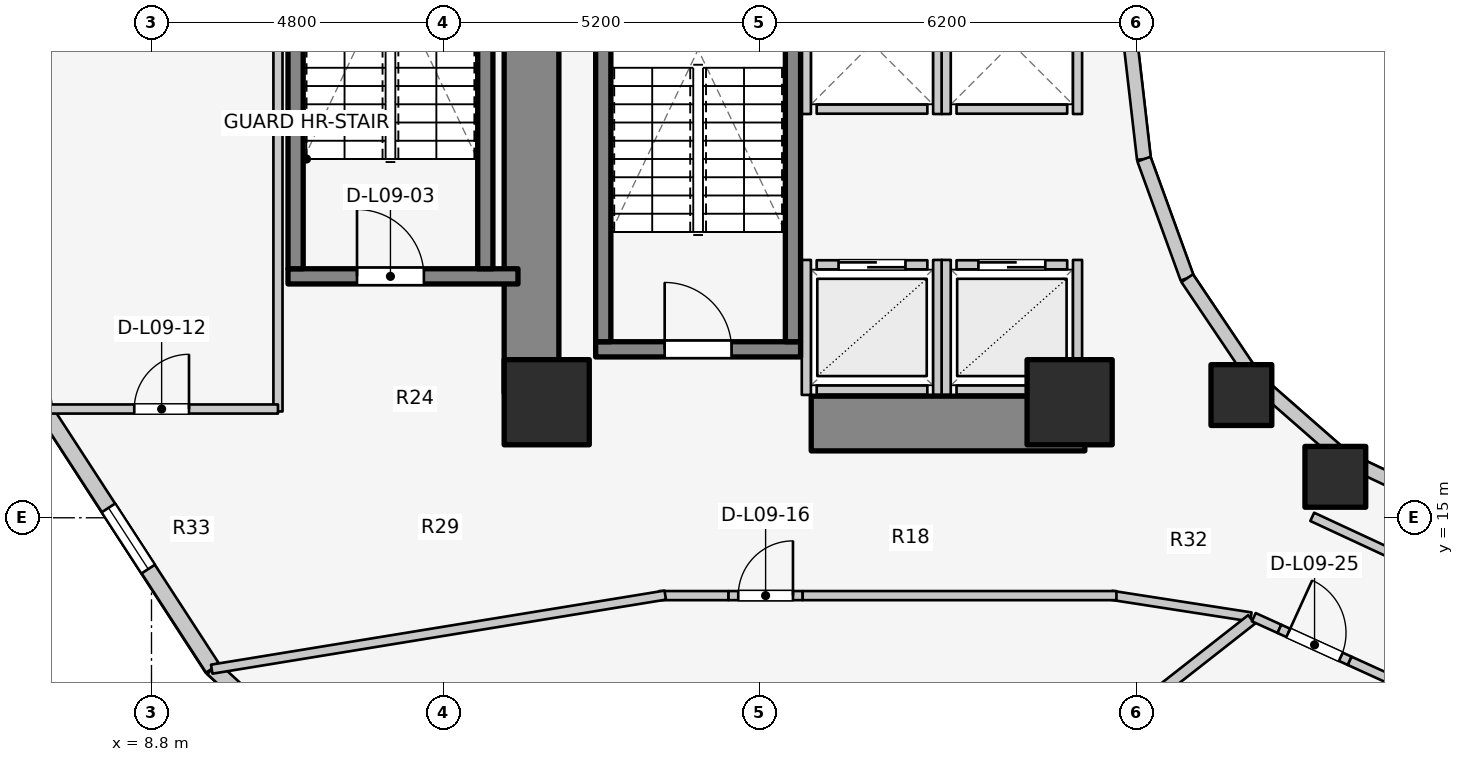
"""IFC4 building model, lengths in metres.
Left out: names, types, materials, properties, quantities, classifications, styles, units other than length and angle.
Written with IfcOpenShell. Run it as: python <this file> out.ifc"""

import sys

from ifc_helpers import new_model, si_unit, direction, frame, frame_2d, origin, origin_2d, place, context, subcontext, project, spatial, rectangle, extrude, element, fill, save


model = new_model("IFC4")
c1 = context("Model", 3, precision=1e-05, world=origin(), true_north=direction((0.0, 1.0)))
c2 = subcontext(c1, "Body", "Model", "MODEL_VIEW")
j1 = project(units=[si_unit("LENGTHUNIT", "METRE"), si_unit("PLANEANGLEUNIT", "RADIAN")], contexts=[c1])
p1 = place(None, origin())
s1 = spatial("IfcSite", under=j1, at=p1, CompositionType="ELEMENT")
p2 = place(p1, origin())
s2 = spatial("IfcBuilding", under=s1, at=p2, CompositionType="ELEMENT")
p3 = place(p2, frame((0.0, 0.0, 33.8)))
s3 = spatial("IfcBuildingStorey", under=s2, at=p3, CompositionType="ELEMENT", Elevation=33.8)
p4 = place(p3, frame((15.05, 17.05, 0.0), z_axis=(0.0, 0.0, 1.0), x_axis=(0.0, 1.0, 0.0)))
e1 = element("IfcWall", 1, at=p4, inside=s3, PredefinedType="SHEAR", context=c2, shape_type="SweptSolid", body=[
    extrude(rectangle(XDim=12.8, YDim=0.9, at=frame_2d((6.4, 0.0))), origin(), (0.0, 0.0, 1.0), 3.1),
])
p5 = place(p3, frame((19.65, 16.55, 0.0), z_axis=(0.0, 0.0, 1.0), x_axis=(1.0, 0.0, 0.0)))
e2 = element("IfcWall", 2, at=p5, inside=s3, PredefinedType="SHEAR", context=c2, shape_type="SweptSolid", body=[
    extrude(rectangle(XDim=4.5, YDim=0.9, at=frame_2d((2.25, 0.0))), origin(), (0.0, 0.0, 1.0), 3.1),
])
p6 = place(p3, frame((16.105, 17.77, 0.0), z_axis=(0.0, 0.0, 1.0), x_axis=(1.0, 0.0, 0.0)))
e3 = element("IfcWall", 3, at=p6, inside=s3, PredefinedType="SOLIDWALL", context=c2, shape_type="SweptSolid", body=[
    extrude(rectangle(XDim=3.37, YDim=0.25, at=frame_2d((1.685, 0.0))), origin(), (0.0, 0.0, 1.0), 3.1),
])
p7 = place(p6, frame((1.135, 0.0, 0.0)))
e4 = element("IfcOpeningElement", 4, at=p7, cuts=e3, PredefinedType="OPENING", context=c2, shape_type="SweptSolid", body=[
    extrude(rectangle(XDim=1.1, YDim=2.1, at=frame_2d((0.55, 1.05))), frame((0.0, 0.135, 0.0), z_axis=(0.0, -1.0, 0.0), x_axis=(1.0, 0.0, 0.0)), (0.0, 0.0, 1.0), 0.27),
])
for number, where, z_axis, x_axis in (
    (5, (16.23, 17.895, 0.0), (0.0, 0.0, 1.0), (0.0, 1.0, 0.0)),
    (6, (19.35, 17.895, 0.0), (0.0, 0.0, 1.0), (0.0, 1.0, 0.0)),
):
    element("IfcWall", number, at=place(p3, frame(where, z_axis=z_axis, x_axis=x_axis)), inside=s3, PredefinedType="SOLIDWALL", context=c2, shape_type="SweptSolid", body=[
        extrude(rectangle(XDim=7.81, YDim=0.25, at=frame_2d((3.905, 0.0))), origin(), (0.0, 0.0, 1.0), 3.1),
    ])
p8 = place(p3, frame((11.045, 18.97, 0.0), z_axis=(0.0, 0.0, 1.0), x_axis=(1.0, 0.0, 0.0)))
e7 = element("IfcWall", 7, at=p8, inside=s3, PredefinedType="SOLIDWALL", context=c2, shape_type="SweptSolid", body=[
    extrude(rectangle(XDim=3.782, YDim=0.25, at=frame_2d((1.891, 0.0))), origin(), (0.0, 0.0, 1.0), 3.1),
])
p9 = place(p8, frame((1.135, 0.0, 0.0)))
e8 = element("IfcOpeningElement", 8, at=p9, cuts=e7, PredefinedType="OPENING", context=c2, shape_type="SweptSolid", body=[
    extrude(rectangle(XDim=1.1, YDim=2.1, at=frame_2d((0.55, 1.05))), frame((0.0, 0.135, 0.0), z_axis=(0.0, -1.0, 0.0), x_axis=(1.0, 0.0, 0.0)), (0.0, 0.0, 1.0), 0.27),
])
for number, where, z_axis, x_axis in (
    (9, (11.17, 19.095, 0.0), (0.0, 0.0, 1.0), (0.0, 1.0, 0.0)),
    (10, (14.29, 19.095, 0.0), (0.0, 0.0, 1.0), (0.0, 1.0, 0.0)),
):
    element("IfcWall", number, at=place(p3, frame(where, z_axis=z_axis, x_axis=x_axis)), inside=s3, PredefinedType="SOLIDWALL", context=c2, shape_type="SweptSolid", body=[
        extrude(rectangle(XDim=7.81, YDim=0.25, at=frame_2d((3.905, 0.0))), origin(), (0.0, 0.0, 1.0), 3.1),
    ])
for number, where, z_axis, x_axis in (
    (11, (15.3, 16.9, 0.0), (0.0, 0.0, 1.0), (1.0, 0.0, 0.0)),
    (12, (23.9, 16.9, 0.0), (0.0, 0.0, 1.0), (1.0, 0.0, 0.0)),
):
    element("IfcColumn", number, at=place(p3, frame(where, z_axis=z_axis, x_axis=x_axis)), inside=s3, PredefinedType="COLUMN", context=c2, shape_type="SweptSolid", body=[
        extrude(rectangle(XDim=1.4, YDim=1.4, at=origin_2d()), origin(), (0.0, 0.0, 1.0), 3.1),
    ])
for number, where, z_axis, x_axis in (
    (13, (26.725, 17.018, 0.0), (0.0, 0.0, 1.0), (1.0, 0.0, 0.0)),
    (14, (28.27, 15.673, 0.0), (0.0, 0.0, 1.0), (1.0, 0.0, 0.0)),
):
    element("IfcColumn", number, at=place(p3, frame(where, z_axis=z_axis, x_axis=x_axis)), inside=s3, PredefinedType="COLUMN", context=c2, shape_type="SweptSolid", body=[
        extrude(rectangle(XDim=1.0, YDim=1.0, at=origin_2d()), origin(), (0.0, 0.0, 1.0), 3.1),
    ])
p10 = place(p3, frame((24.88, 23.0, 0.0), z_axis=(0.0, 0.0, 1.0), x_axis=(0.114711713601, -0.993398823617, 0.0)))
e15 = element("IfcWall", 15, at=p10, inside=s3, PredefinedType="STANDARD", context=c2, shape_type="SweptSolid", body=[
    extrude(rectangle(XDim=2.115, YDim=0.23, at=frame_2d((1.058, 0.0))), origin(), (0.0, 0.0, 1.0), 2.56),
])
p11 = place(p3, frame((25.123, 20.898, 0.0), z_axis=(0.0, 0.0, 1.0), x_axis=(0.341423187295, -0.93990968033, 0.0)))
e16 = element("IfcWall", 16, at=p11, inside=s3, PredefinedType="STANDARD", context=c2, shape_type="SweptSolid", body=[
    extrude(rectangle(XDim=2.084, YDim=0.23, at=frame_2d((1.042, 0.0))), origin(), (0.0, 0.0, 1.0), 2.56),
])
p12 = place(p3, frame((25.834, 18.94, 0.0), z_axis=(0.0, 0.0, 1.0), x_axis=(0.558197800898, -0.829707909492, 0.0)))
e17 = element("IfcWall", 17, at=p12, inside=s3, PredefinedType="STANDARD", context=c2, shape_type="SweptSolid", body=[
    extrude(rectangle(XDim=2.027, YDim=0.23, at=frame_2d((1.013, 0.0))), origin(), (0.0, 0.0, 1.0), 1.22),
])
p13 = place(p3, frame((26.965, 17.258, 0.0), z_axis=(0.0, 0.0, 1.0), x_axis=(0.752576694707, -0.658504607869, 0.0)))
e18 = element("IfcWall", 18, at=p13, inside=s3, PredefinedType="STANDARD", context=c2, shape_type="SweptSolid", body=[
    extrude(rectangle(XDim=1.959, YDim=0.23, at=frame_2d((0.98, 0.0))), origin(), (0.0, 0.0, 1.0), 1.22),
])
p14 = place(p3, frame((28.44, 15.968, 0.0), z_axis=(0.0, 0.0, 1.0), x_axis=(0.904179699603, -0.427152280606, 0.0)))
e19 = element("IfcWall", 19, at=p14, inside=s3, PredefinedType="STANDARD", context=c2, shape_type="SweptSolid", body=[
    extrude(rectangle(XDim=1.899, YDim=0.23, at=frame_2d((0.95, 0.0))), origin(), (0.0, 0.0, 1.0), 1.22),
])
p15 = place(p3, frame((7.033, 16.795, 0.0), z_axis=(0.0, 0.0, 1.0), x_axis=(0.544578722263, -0.838709732421, 0.0)))
e20 = element("IfcWall", 20, at=p15, inside=s3, PredefinedType="STANDARD", context=c2, shape_type="SweptSolid", body=[
    extrude(rectangle(XDim=5.092, YDim=0.26, at=frame_2d((2.546, 0.0))), origin(), (0.0, 0.0, 1.0), 1.22),
])
p16 = place(p15, frame((1.946, 0.0, 0.15)))
e21 = element("IfcOpeningElement", 21, at=p16, cuts=e20, PredefinedType="OPENING", context=c2, shape_type="SweptSolid", body=[
    extrude(rectangle(XDim=1.2, YDim=0.9, at=frame_2d((0.6, 0.45))), frame((0.0, 0.14, 0.0), z_axis=(0.0, -1.0, 0.0), x_axis=(1.0, 0.0, 0.0)), (0.0, 0.0, 1.0), 0.28),
])
p17 = place(p3, frame((9.806, 12.524, 0.0), z_axis=(0.0, 0.0, 1.0), x_axis=(0.735655109293, -0.67735630223, 0.0)))
e22 = element("IfcWall", 22, at=p17, inside=s3, PredefinedType="STANDARD", context=c2, shape_type="SweptSolid", body=[
    extrude(rectangle(XDim=5.151, YDim=0.26, at=frame_2d((2.575, 0.0))), origin(), (0.0, 0.0, 1.0), 1.22),
])
p18 = place(p17, frame((1.976, 0.0, 0.15)))
e23 = element("IfcOpeningElement", 23, at=p18, cuts=e22, PredefinedType="OPENING", context=c2, shape_type="SweptSolid", body=[
    extrude(rectangle(XDim=1.2, YDim=0.9, at=frame_2d((0.6, 0.45))), frame((0.0, 0.14, 0.0), z_axis=(0.0, -1.0, 0.0), x_axis=(1.0, 0.0, 0.0)), (0.0, 0.0, 1.0), 0.28),
])
p19 = place(p3, frame((19.74, 19.16, 0.0), z_axis=(0.0, 0.0, 1.0), x_axis=(1.0, 0.0, 0.0)))
e24 = element("IfcWall", 24, at=p19, inside=s3, PredefinedType="SOLIDWALL", context=c2, shape_type="SweptSolid", body=[
    extrude(rectangle(XDim=1.82, YDim=0.15, at=frame_2d((0.91, 0.0))), origin(), (0.0, 0.0, 1.0), 2.575),
])
p20 = place(p19, frame((0.36, 0.0, 0.0)))
e25 = element("IfcOpeningElement", 25, at=p20, cuts=e24, PredefinedType="OPENING", context=c2, shape_type="SweptSolid", body=[
    extrude(rectangle(XDim=1.1, YDim=2.1, at=frame_2d((0.55, 1.05))), frame((0.0, 0.085, 0.0), z_axis=(0.0, -1.0, 0.0), x_axis=(1.0, 0.0, 0.0)), (0.0, 0.0, 1.0), 0.17),
])
p21 = place(p3, frame((19.74, 17.1, 0.0), z_axis=(0.0, 0.0, 1.0), x_axis=(1.0, 0.0, 0.0)))
e26 = element("IfcWall", 26, at=p21, inside=s3, PredefinedType="SOLIDWALL", context=c2, shape_type="SweptSolid", body=[
    extrude(rectangle(XDim=1.82, YDim=0.15, at=frame_2d((0.91, 0.0))), origin(), (0.0, 0.0, 1.0), 2.575),
])
p22 = place(p3, frame((19.57, 17.02, 0.0), z_axis=(0.0, 0.0, 1.0), x_axis=(0.0, 1.0, 0.0)))
e27 = element("IfcWall", 27, at=p22, inside=s3, PredefinedType="SOLIDWALL", context=c2, shape_type="SweptSolid", body=[
    extrude(rectangle(XDim=2.22, YDim=0.15, at=frame_2d((1.11, 0.0))), origin(), (0.0, 0.0, 1.0), 2.12),
])
p23 = place(p3, frame((21.73, 17.02, 0.0), z_axis=(0.0, 0.0, 1.0), x_axis=(0.0, 1.0, 0.0)))
e28 = element("IfcWall", 28, at=p23, inside=s3, PredefinedType="SOLIDWALL", context=c2, shape_type="SweptSolid", body=[
    extrude(rectangle(XDim=2.22, YDim=0.15, at=frame_2d((1.11, 0.0))), origin(), (0.0, 0.0, 1.0), 2.575),
])
p24 = place(p3, frame((22.04, 19.16, 0.0), z_axis=(0.0, 0.0, 1.0), x_axis=(1.0, 0.0, 0.0)))
e29 = element("IfcWall", 29, at=p24, inside=s3, PredefinedType="SOLIDWALL", context=c2, shape_type="SweptSolid", body=[
    extrude(rectangle(XDim=1.82, YDim=0.15, at=frame_2d((0.91, 0.0))), origin(), (0.0, 0.0, 1.0), 2.12),
])
p25 = place(p24, frame((0.36, 0.0, 0.0)))
e30 = element("IfcOpeningElement", 30, at=p25, cuts=e29, PredefinedType="OPENING", context=c2, shape_type="SweptSolid", body=[
    extrude(rectangle(XDim=1.1, YDim=2.1, at=frame_2d((0.55, 1.05))), frame((0.0, 0.085, 0.0), z_axis=(0.0, -1.0, 0.0), x_axis=(1.0, 0.0, 0.0)), (0.0, 0.0, 1.0), 0.17),
])
p26 = place(p3, frame((22.04, 17.1, 0.0), z_axis=(0.0, 0.0, 1.0), x_axis=(1.0, 0.0, 0.0)))
e31 = element("IfcWall", 31, at=p26, inside=s3, PredefinedType="SOLIDWALL", context=c2, shape_type="SweptSolid", body=[
    extrude(rectangle(XDim=1.82, YDim=0.15, at=frame_2d((0.91, 0.0))), origin(), (0.0, 0.0, 1.0), 2.12),
])
p27 = place(p3, frame((21.87, 17.02, 0.0), z_axis=(0.0, 0.0, 1.0), x_axis=(0.0, 1.0, 0.0)))
e32 = element("IfcWall", 32, at=p27, inside=s3, PredefinedType="SOLIDWALL", context=c2, shape_type="SweptSolid", body=[
    extrude(rectangle(XDim=2.22, YDim=0.15, at=frame_2d((1.11, 0.0))), origin(), (0.0, 0.0, 1.0), 2.575),
])
p28 = place(p3, frame((24.03, 17.02, 0.0), z_axis=(0.0, 0.0, 1.0), x_axis=(0.0, 1.0, 0.0)))
e33 = element("IfcWall", 33, at=p28, inside=s3, PredefinedType="SOLIDWALL", context=c2, shape_type="SweptSolid", body=[
    extrude(rectangle(XDim=2.22, YDim=0.15, at=frame_2d((1.11, 0.0))), origin(), (0.0, 0.0, 1.0), 1.873),
])
p29 = place(p3, frame((19.74, 21.72, 0.0), z_axis=(0.0, 0.0, 1.0), x_axis=(1.0, 0.0, 0.0)))
e34 = element("IfcWall", 34, at=p29, inside=s3, PredefinedType="SOLIDWALL", context=c2, shape_type="SweptSolid", body=[
    extrude(rectangle(XDim=1.82, YDim=0.15, at=frame_2d((0.91, 0.0))), origin(), (0.0, 0.0, 1.0), 2.575),
])
for number, where, z_axis, x_axis in (
    (35, (19.57, 21.64, 0.0), (0.0, 0.0, 1.0), (0.0, 1.0, 0.0)),
    (36, (21.73, 21.64, 0.0), (0.0, 0.0, 1.0), (0.0, 1.0, 0.0)),
):
    element("IfcWall", number, at=place(p3, frame(where, z_axis=z_axis, x_axis=x_axis)), inside=s3, PredefinedType="SOLIDWALL", context=c2, shape_type="SweptSolid", body=[
        extrude(rectangle(XDim=2.32, YDim=0.15, at=frame_2d((1.16, 0.0))), origin(), (0.0, 0.0, 1.0), 2.575),
    ])
p30 = place(p3, frame((22.04, 21.72, 0.0), z_axis=(0.0, 0.0, 1.0), x_axis=(1.0, 0.0, 0.0)))
e37 = element("IfcWall", 37, at=p30, inside=s3, PredefinedType="SOLIDWALL", context=c2, shape_type="SweptSolid", body=[
    extrude(rectangle(XDim=1.82, YDim=0.15, at=frame_2d((0.91, 0.0))), origin(), (0.0, 0.0, 1.0), 2.12),
])
p31 = place(p3, frame((21.87, 21.64, 0.0), z_axis=(0.0, 0.0, 1.0), x_axis=(0.0, 1.0, 0.0)))
e38 = element("IfcWall", 38, at=p31, inside=s3, PredefinedType="SOLIDWALL", context=c2, shape_type="SweptSolid", body=[
    extrude(rectangle(XDim=2.32, YDim=0.15, at=frame_2d((1.16, 0.0))), origin(), (0.0, 0.0, 1.0), 2.575),
])
p32 = place(p3, frame((24.03, 21.64, 0.0), z_axis=(0.0, 0.0, 1.0), x_axis=(0.0, 1.0, 0.0)))
e39 = element("IfcWall", 39, at=p32, inside=s3, PredefinedType="SOLIDWALL", context=c2, shape_type="SweptSolid", body=[
    extrude(rectangle(XDim=2.32, YDim=0.15, at=frame_2d((1.16, 0.0))), origin(), (0.0, 0.0, 1.0), 2.12),
])
p33 = place(p3, frame((27.89, 15.015, 0.0), z_axis=(0.0, 0.0, 1.0), x_axis=(0.906943449489, -0.421252393975, 0.0)))
e40 = element("IfcWall", 40, at=p33, inside=s3, PredefinedType="PARTITIONING", context=c2, shape_type="SweptSolid", body=[
    extrude(rectangle(XDim=2.186, YDim=0.15, at=frame_2d((1.093, 0.0))), origin(), (0.0, 0.0, 1.0), 1.22),
])
p34 = place(p3, frame((10.88, 16.748, 0.0), z_axis=(0.0, 0.0, 1.0), x_axis=(0.0, 1.0, 0.0)))
e41 = element("IfcWall", 41, at=p34, inside=s3, PredefinedType="PARTITIONING", context=c2, shape_type="SweptSolid", body=[
    extrude(rectangle(XDim=12.503, YDim=0.15, at=frame_2d((6.252, 0.0))), origin(), (0.0, 0.0, 1.0), 2.12),
])
p35 = place(p3, frame((7.014, 16.788, 0.0), z_axis=(0.0, 0.0, 1.0), x_axis=(1.0, 0.0, 0.0)))
e42 = element("IfcWall", 42, at=p35, inside=s3, PredefinedType="PARTITIONING", context=c2, shape_type="SweptSolid", body=[
    extrude(rectangle(XDim=3.866, YDim=0.15, at=frame_2d((1.933, 0.0))), origin(), (0.0, 0.0, 1.0), 2.575),
])
p36 = place(p35, frame((1.503, 0.0, 0.0)))
e43 = element("IfcOpeningElement", 43, at=p36, cuts=e42, PredefinedType="OPENING", context=c2, shape_type="SweptSolid", body=[
    extrude(rectangle(XDim=0.9, YDim=2.1, at=frame_2d((0.45, 1.05))), frame((0.0, 0.085, 0.0), z_axis=(0.0, -1.0, 0.0), x_axis=(1.0, 0.0, 0.0)), (0.0, 0.0, 1.0), 0.17),
])
p37 = place(p3, frame((26.881, 13.369, 0.0), z_axis=(0.0, 0.0, 1.0), x_axis=(-0.988184633586, 0.153268163508, 0.0)))
e44 = element("IfcWall", 44, at=p37, inside=s3, PredefinedType="PARTITIONING", context=c2, shape_type="SweptSolid", body=[
    extrude(rectangle(XDim=2.318, YDim=0.15, at=frame_2d((1.159, 0.0))), origin(), (0.0, 0.0, 1.0), 1.22),
])
p38 = place(p3, frame((17.15, 13.72, 0.0), z_axis=(0.0, 0.0, 1.0), x_axis=(1.0, 0.0, 0.0)))
e45 = element("IfcWall", 45, at=p38, inside=s3, PredefinedType="PARTITIONING", context=c2, shape_type="SweptSolid", body=[
    extrude(rectangle(XDim=1.14, YDim=0.15, at=frame_2d((0.57, 0.0))), origin(), (0.0, 0.0, 1.0), 2.575),
])
p39 = place(p3, frame((18.29, 13.72, 0.0), z_axis=(0.0, 0.0, 1.0), x_axis=(1.0, 0.0, 0.0)))
e46 = element("IfcWall", 46, at=p39, inside=s3, PredefinedType="PARTITIONING", context=c2, shape_type="SweptSolid", body=[
    extrude(rectangle(XDim=1.22, YDim=0.15, at=frame_2d((0.61, 0.0))), origin(), (0.0, 0.0, 1.0), 2.575),
])
p40 = place(p39, frame((0.16, 0.0, 0.0)))
e47 = element("IfcOpeningElement", 47, at=p40, cuts=e46, PredefinedType="OPENING", context=c2, shape_type="SweptSolid", body=[
    extrude(rectangle(XDim=0.9, YDim=2.1, at=frame_2d((0.45, 1.05))), frame((0.0, 0.085, 0.0), z_axis=(0.0, -1.0, 0.0), x_axis=(1.0, 0.0, 0.0)), (0.0, 0.0, 1.0), 0.17),
])
p41 = place(p3, frame((19.51, 13.72, 0.0), z_axis=(0.0, 0.0, 1.0), x_axis=(1.0, 0.0, 0.0)))
e48 = element("IfcWall", 48, at=p41, inside=s3, PredefinedType="PARTITIONING", context=c2, shape_type="SweptSolid", body=[
    extrude(rectangle(XDim=5.16, YDim=0.15, at=frame_2d((2.58, 0.0))), origin(), (0.0, 0.0, 1.0), 1.22),
])
p42 = place(p3, frame((17.249, 13.728, 0.0), z_axis=(0.0, 0.0, 1.0), x_axis=(-0.98693078372, -0.161144742846, 0.0)))
e49 = element("IfcWall", 49, at=p42, inside=s3, PredefinedType="PARTITIONING", context=c2, shape_type="SweptSolid", body=[
    extrude(rectangle(XDim=7.557, YDim=0.15, at=frame_2d((3.779, 0.0))), origin(), (0.0, 0.0, 1.0), 1.22),
])
p43 = place(p3, frame((26.892, 13.327, 0.0), z_axis=(0.0, 0.0, 1.0), x_axis=(-0.78700868866, -0.616941912966, 0.0)))
e50 = element("IfcWall", 50, at=p43, inside=s3, PredefinedType="PARTITIONING", context=c2, shape_type="SweptSolid", body=[
    extrude(rectangle(XDim=10.583, YDim=0.18, at=frame_2d((5.292, 0.0))), origin(), (0.0, 0.0, 1.0), 1.22),
])
p44 = place(p3, frame((29.406, 12.29, 0.0), z_axis=(0.0, 0.0, 1.0), x_axis=(-0.568653635333, -0.822577074214, 0.0)))
e51 = element("IfcWall", 51, at=p44, inside=s3, PredefinedType="PLUMBINGWALL", context=c2, shape_type="SweptSolid", body=[
    extrude(rectangle(XDim=2.1, YDim=0.14, at=frame_2d((1.05, 0.0))), origin(), (0.0, 0.0, 1.0), 1.22),
])
p45 = place(p3, frame((26.929, 13.365, 0.0), z_axis=(0.0, 0.0, 1.0), x_axis=(0.910185690705, -0.414200444756, 0.0)))
e52 = element("IfcWall", 52, at=p45, inside=s3, PredefinedType="PARTITIONING", context=c2, shape_type="SweptSolid", body=[
    extrude(rectangle(XDim=0.463, YDim=0.15, at=frame_2d((0.231, 0.0))), origin(), (0.0, 0.0, 1.0), 2.575),
])
p46 = place(p3, frame((27.35, 13.173, 0.0), z_axis=(0.0, 0.0, 1.0), x_axis=(0.910168885926, -0.414237370469, 0.0)))
e53 = element("IfcWall", 53, at=p46, inside=s3, PredefinedType="PARTITIONING", context=c2, shape_type="SweptSolid", body=[
    extrude(rectangle(XDim=1.27, YDim=0.15, at=frame_2d((0.635, 0.0))), origin(), (0.0, 0.0, 1.0), 2.16),
])
p47 = place(p46, frame((0.16, 0.0, 0.0)))
e54 = element("IfcOpeningElement", 54, at=p47, cuts=e53, PredefinedType="OPENING", context=c2, shape_type="SweptSolid", body=[
    extrude(rectangle(XDim=0.95, YDim=2.1, at=frame_2d((0.475, 1.05))), frame((0.0, 0.085, 0.0), z_axis=(0.0, -1.0, 0.0), x_axis=(1.0, 0.0, 0.0)), (0.0, 0.0, 1.0), 0.17),
])
p48 = place(p3, frame((28.506, 12.647, 0.0), z_axis=(0.0, 0.0, 1.0), x_axis=(0.910210554917, -0.414145802487, 0.0)))
e55 = element("IfcWall", 55, at=p48, inside=s3, PredefinedType="PARTITIONING", context=c2, shape_type="SweptSolid", body=[
    extrude(rectangle(XDim=0.966, YDim=0.15, at=frame_2d((0.483, 0.0))), origin(), (0.0, 0.0, 1.0), 1.22),
])
p49 = place(p16, origin())
e56 = element("IfcWindow", 56, at=p49, inside=s3, PartitioningType="SINGLE_PANEL", PredefinedType="WINDOW", context=c2, shape_type="SweptSolid", body=[
    extrude(rectangle(XDim=1.2, YDim=0.9, at=frame_2d((0.6, 0.45))), frame((0.0, 0.03, 0.0), z_axis=(0.0, -1.0, 0.0), x_axis=(1.0, 0.0, 0.0)), (0.0, 0.0, 1.0), 0.06),
])
fill(e21, e56)
p50 = place(p7, origin())
e57 = element("IfcDoor", 57, at=p50, inside=s3, OperationType="SINGLE_SWING_LEFT", PredefinedType="DOOR", context=c2, shape_type="SweptSolid", body=[
    extrude(rectangle(XDim=1.1, YDim=2.1, at=frame_2d((0.55, 1.05))), frame((0.0, 0.025, 0.0), z_axis=(0.0, -1.0, 0.0), x_axis=(1.0, 0.0, 0.0)), (0.0, 0.0, 1.0), 0.05),
])
fill(e4, e57)
p51 = place(p9, origin())
e58 = element("IfcDoor", 58, at=p51, inside=s3, OperationType="SINGLE_SWING_LEFT", PredefinedType="DOOR", context=c2, shape_type="SweptSolid", body=[
    extrude(rectangle(XDim=1.1, YDim=2.1, at=frame_2d((0.55, 1.05))), frame((0.0, 0.025, 0.0), z_axis=(0.0, -1.0, 0.0), x_axis=(1.0, 0.0, 0.0)), (0.0, 0.0, 1.0), 0.05),
])
fill(e8, e58)
p52 = place(p20, origin())
e59 = element("IfcDoor", 59, at=p52, inside=s3, OperationType="DOUBLE_DOOR_SLIDING", PredefinedType="DOOR", context=c2, shape_type="SweptSolid", body=[
    extrude(rectangle(XDim=1.1, YDim=2.1, at=frame_2d((0.55, 1.05))), frame((0.0, 0.025, 0.0), z_axis=(0.0, -1.0, 0.0), x_axis=(1.0, 0.0, 0.0)), (0.0, 0.0, 1.0), 0.05),
])
fill(e25, e59)
p53 = place(p25, origin())
e60 = element("IfcDoor", 60, at=p53, inside=s3, OperationType="DOUBLE_DOOR_SLIDING", PredefinedType="DOOR", context=c2, shape_type="SweptSolid", body=[
    extrude(rectangle(XDim=1.1, YDim=2.1, at=frame_2d((0.55, 1.05))), frame((0.0, 0.025, 0.0), z_axis=(0.0, -1.0, 0.0), x_axis=(1.0, 0.0, 0.0)), (0.0, 0.0, 1.0), 0.05),
])
fill(e30, e60)
p54 = place(p36, origin())
e61 = element("IfcDoor", 61, at=p54, inside=s3, OperationType="SINGLE_SWING_RIGHT", PredefinedType="DOOR", context=c2, shape_type="SweptSolid", body=[
    extrude(rectangle(XDim=0.9, YDim=2.1, at=frame_2d((0.45, 1.05))), frame((0.0, 0.025, 0.0), z_axis=(0.0, -1.0, 0.0), x_axis=(1.0, 0.0, 0.0)), (0.0, 0.0, 1.0), 0.05),
])
fill(e43, e61)
p55 = place(p40, origin())
e62 = element("IfcDoor", 62, at=p55, inside=s3, OperationType="SINGLE_SWING_RIGHT", PredefinedType="DOOR", context=c2, shape_type="SweptSolid", body=[
    extrude(rectangle(XDim=0.9, YDim=2.1, at=frame_2d((0.45, 1.05))), frame((0.0, 0.025, 0.0), z_axis=(0.0, -1.0, 0.0), x_axis=(1.0, 0.0, 0.0)), (0.0, 0.0, 1.0), 0.05),
])
fill(e47, e62)
p56 = place(p47, origin())
e63 = element("IfcDoor", 63, at=p56, inside=s3, OperationType="SINGLE_SWING_LEFT", PredefinedType="DOOR", context=c2, shape_type="SweptSolid", body=[
    extrude(rectangle(XDim=0.95, YDim=2.1, at=frame_2d((0.475, 1.05))), frame((0.0, 0.025, 0.0), z_axis=(0.0, -1.0, 0.0), x_axis=(1.0, 0.0, 0.0)), (0.0, 0.0, 1.0), 0.05),
])
fill(e54, e63)
save(model, sys.argv[1])
